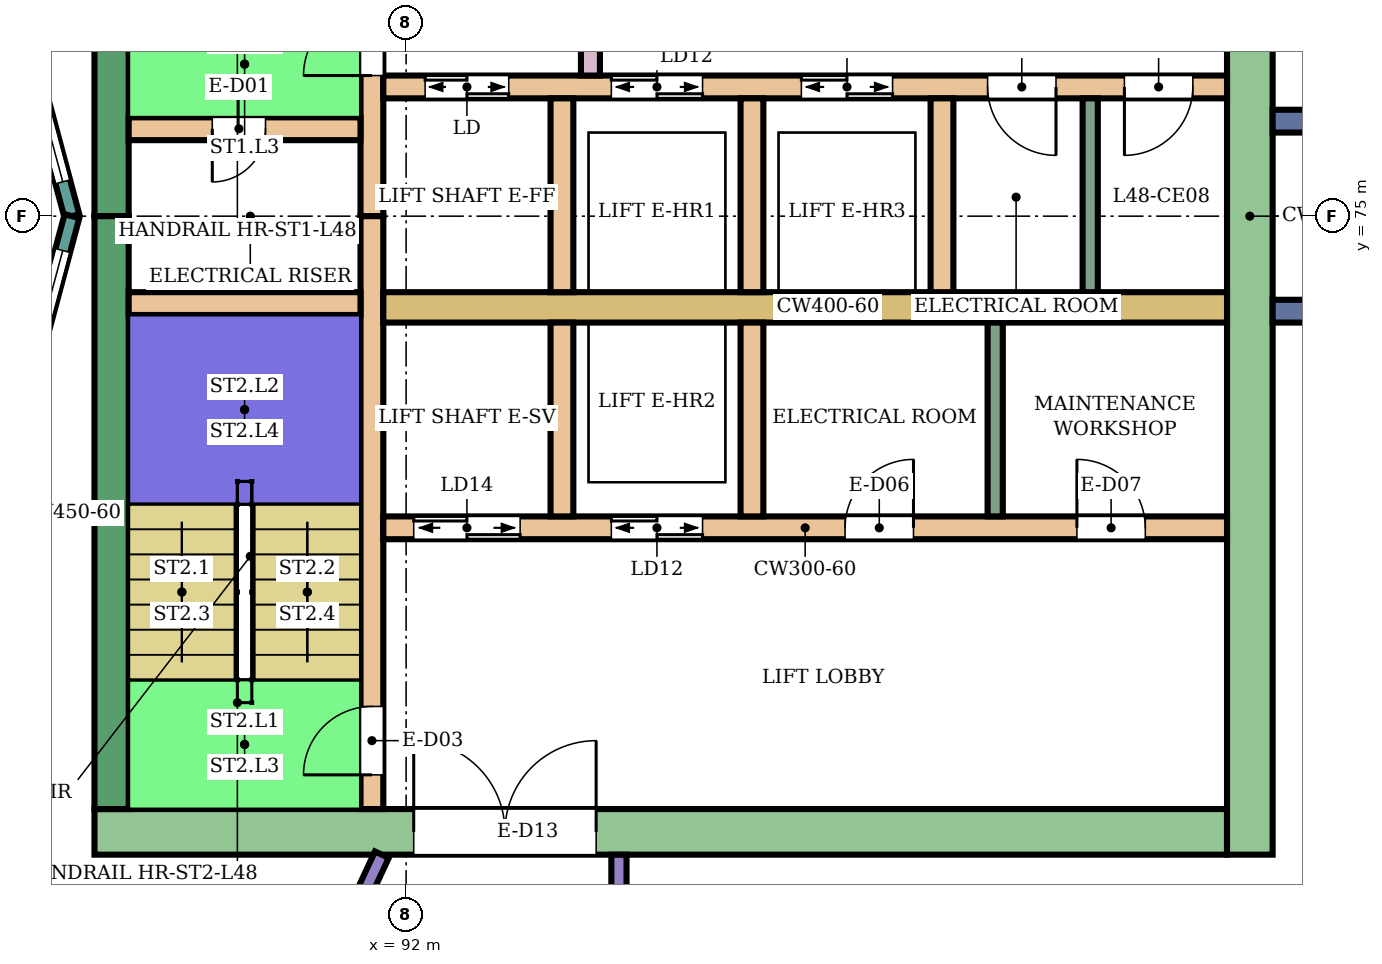
"""IFC4 building model, lengths in metres.
Left out: names, types, materials, properties, quantities, classifications, styles, units other than length and angle.
Written with IfcOpenShell. Run it as: python <this file> out.ifc"""

import sys

from ifc_helpers import new_model, si_unit, direction, frame, frame_2d, origin, place, context, subcontext, project, spatial, rectangle, extrude, element, fill, save


model = new_model("IFC4")
c1 = context("Model", 3, precision=1e-05, world=origin(), true_north=direction((0.0, 1.0)))
c2 = subcontext(c1, "Body", "Model", "MODEL_VIEW")
j1 = project(units=[si_unit("LENGTHUNIT", "METRE"), si_unit("PLANEANGLEUNIT", "RADIAN")], contexts=[c1])
p1 = place(None, origin())
s1 = spatial("IfcSite", under=j1, at=p1, CompositionType="ELEMENT")
p2 = place(p1, origin())
s2 = spatial("IfcBuilding", under=s1, at=p2, CompositionType="ELEMENT")
p3 = place(p2, frame((0.0, 0.0, 206.9)))
s3 = spatial("IfcBuildingStorey", under=s2, at=p3, CompositionType="ELEMENT", Elevation=206.9)
p4 = place(p3, frame((87.9, 66.9, 0.0), z_axis=(0.0, 0.0, 1.0), x_axis=(1.0, 0.0, 0.0)))
e1 = element("IfcWall", 1, at=p4, inside=s3, PredefinedType="SHEAR", context=c2, shape_type="SweptSolid", body=[
    extrude(rectangle(XDim=14.9, YDim=0.6, at=frame_2d((7.45, 0.0))), origin(), (0.0, 0.0, 1.0), 5.28),
])
p5 = place(p4, frame((4.2, 0.0, 0.0)))
e2 = element("IfcOpeningElement", 2, at=p5, cuts=e1, PredefinedType="OPENING", context=c2, shape_type="SweptSolid", body=[
    extrude(rectangle(XDim=2.4, YDim=2.4, at=frame_2d((1.2, 1.2))), frame((0.0, 0.31, 0.0), z_axis=(0.0, -1.0, 0.0), x_axis=(1.0, 0.0, 0.0)), (0.0, 0.0, 1.0), 0.62),
])
for number, where, z_axis, x_axis in (
    (3, (88.125, 75.0, 0.0), (0.0, 0.0, 1.0), (0.0, 1.0, 0.0)),
    (4, (88.125, 67.2, 0.0), (0.0, 0.0, 1.0), (0.0, 1.0, 0.0)),
):
    element("IfcWall", number, at=place(p3, frame(where, z_axis=z_axis, x_axis=x_axis)), inside=s3, PredefinedType="SHEAR", context=c2, shape_type="SweptSolid", body=[
        extrude(rectangle(XDim=7.8, YDim=0.45, at=frame_2d((3.9, 0.0))), origin(), (0.0, 0.0, 1.0), 5.28),
    ])
p6 = place(p3, frame((103.1, 66.6, 0.0), z_axis=(0.0, 0.0, 1.0), x_axis=(0.0, 1.0, 0.0)))
e5 = element("IfcWall", 5, at=p6, inside=s3, PredefinedType="SHEAR", context=c2, shape_type="SweptSolid", body=[
    extrude(rectangle(XDim=16.8, YDim=0.6, at=frame_2d((8.4, 0.0))), origin(), (0.0, 0.0, 1.0), 5.28),
])
p7 = place(p3, frame((91.55, 75.0, 0.0), z_axis=(0.0, 0.0, 1.0), x_axis=(0.0, 1.0, 0.0)))
e6 = element("IfcWall", 6, at=p7, inside=s3, PredefinedType="SHEAR", context=c2, shape_type="SweptSolid", body=[
    extrude(rectangle(XDim=7.8, YDim=0.3, at=frame_2d((3.9, 0.0))), origin(), (0.0, 0.0, 1.0), 5.28),
])
p8 = place(p7, frame((1.85, 0.0, 0.0)))
e7 = element("IfcOpeningElement", 7, at=p8, cuts=e6, PredefinedType="OPENING", context=c2, shape_type="SweptSolid", body=[
    extrude(rectangle(XDim=0.9, YDim=2.1, at=frame_2d((0.45, 1.05))), frame((0.0, 0.16, 0.0), z_axis=(0.0, -1.0, 0.0), x_axis=(1.0, 0.0, 0.0)), (0.0, 0.0, 1.0), 0.32),
])
p9 = place(p3, frame((91.55, 67.2, 0.0), z_axis=(0.0, 0.0, 1.0), x_axis=(0.0, 1.0, 0.0)))
e8 = element("IfcWall", 8, at=p9, inside=s3, PredefinedType="SHEAR", context=c2, shape_type="SweptSolid", body=[
    extrude(rectangle(XDim=7.8, YDim=0.3, at=frame_2d((3.9, 0.0))), origin(), (0.0, 0.0, 1.0), 5.28),
])
p10 = place(p9, frame((0.45, 0.0, 0.0)))
e9 = element("IfcOpeningElement", 9, at=p10, cuts=e8, PredefinedType="OPENING", context=c2, shape_type="SweptSolid", body=[
    extrude(rectangle(XDim=0.9, YDim=2.1, at=frame_2d((0.45, 1.05))), frame((0.0, 0.16, 0.0), z_axis=(0.0, -1.0, 0.0), x_axis=(1.0, 0.0, 0.0)), (0.0, 0.0, 1.0), 0.32),
])
p11 = place(p3, frame((88.35, 76.15, 0.0), z_axis=(0.0, 0.0, 1.0), x_axis=(1.0, 0.0, 0.0)))
e10 = element("IfcWall", 10, at=p11, inside=s3, PredefinedType="SHEAR", context=c2, shape_type="SweptSolid", body=[
    extrude(rectangle(XDim=3.05, YDim=0.3, at=frame_2d((1.525, 0.0))), origin(), (0.0, 0.0, 1.0), 5.28),
])
p12 = place(p11, frame((1.1, 0.0, 0.0)))
e11 = element("IfcOpeningElement", 11, at=p12, cuts=e10, PredefinedType="OPENING", context=c2, shape_type="SweptSolid", body=[
    extrude(rectangle(XDim=0.7, YDim=2.0, at=frame_2d((0.35, 1.0))), frame((0.0, 0.16, 0.0), z_axis=(0.0, -1.0, 0.0), x_axis=(1.0, 0.0, 0.0)), (0.0, 0.0, 1.0), 0.32),
])
p13 = place(p3, frame((88.35, 73.85, 0.0), z_axis=(0.0, 0.0, 1.0), x_axis=(1.0, 0.0, 0.0)))
e12 = element("IfcWall", 12, at=p13, inside=s3, PredefinedType="SHEAR", context=c2, shape_type="SweptSolid", body=[
    extrude(rectangle(XDim=3.05, YDim=0.3, at=frame_2d((1.525, 0.0))), origin(), (0.0, 0.0, 1.0), 5.28),
])
p14 = place(p3, frame((91.7, 76.7, 0.0), z_axis=(0.0, 0.0, 1.0), x_axis=(1.0, 0.0, 0.0)))
e13 = element("IfcWall", 13, at=p14, inside=s3, PredefinedType="SHEAR", context=c2, shape_type="SweptSolid", body=[
    extrude(rectangle(XDim=11.1, YDim=0.3, at=frame_2d((5.55, 0.0))), origin(), (0.0, 0.0, 1.0), 5.28),
])
p15 = place(p14, frame((0.55, 0.0, 0.0)))
e14 = element("IfcOpeningElement", 14, at=p15, cuts=e13, PredefinedType="OPENING", context=c2, shape_type="SweptSolid", body=[
    extrude(rectangle(XDim=1.1, YDim=2.1, at=frame_2d((0.55, 1.05))), frame((0.0, 0.16, 0.0), z_axis=(0.0, -1.0, 0.0), x_axis=(1.0, 0.0, 0.0)), (0.0, 0.0, 1.0), 0.32),
])
p16 = place(p14, frame((3.0, 0.0, 0.0)))
e15 = element("IfcOpeningElement", 15, at=p16, cuts=e13, PredefinedType="OPENING", context=c2, shape_type="SweptSolid", body=[
    extrude(rectangle(XDim=1.2, YDim=2.1, at=frame_2d((0.6, 1.05))), frame((0.0, 0.16, 0.0), z_axis=(0.0, -1.0, 0.0), x_axis=(1.0, 0.0, 0.0)), (0.0, 0.0, 1.0), 0.32),
])
p17 = place(p14, frame((5.5, 0.0, 0.0)))
e16 = element("IfcOpeningElement", 16, at=p17, cuts=e13, PredefinedType="OPENING", context=c2, shape_type="SweptSolid", body=[
    extrude(rectangle(XDim=1.2, YDim=2.1, at=frame_2d((0.6, 1.05))), frame((0.0, 0.16, 0.0), z_axis=(0.0, -1.0, 0.0), x_axis=(1.0, 0.0, 0.0)), (0.0, 0.0, 1.0), 0.32),
])
p18 = place(p14, frame((7.95, 0.0, 0.0)))
e17 = element("IfcOpeningElement", 17, at=p18, cuts=e13, PredefinedType="OPENING", context=c2, shape_type="SweptSolid", body=[
    extrude(rectangle(XDim=0.9, YDim=2.1, at=frame_2d((0.45, 1.05))), frame((0.0, 0.16, 0.0), z_axis=(0.0, -1.0, 0.0), x_axis=(1.0, 0.0, 0.0)), (0.0, 0.0, 1.0), 0.32),
])
p19 = place(p14, frame((9.75, 0.0, 0.0)))
e18 = element("IfcOpeningElement", 18, at=p19, cuts=e13, PredefinedType="OPENING", context=c2, shape_type="SweptSolid", body=[
    extrude(rectangle(XDim=0.9, YDim=2.1, at=frame_2d((0.45, 1.05))), frame((0.0, 0.16, 0.0), z_axis=(0.0, -1.0, 0.0), x_axis=(1.0, 0.0, 0.0)), (0.0, 0.0, 1.0), 0.32),
])
p20 = place(p3, frame((91.7, 73.8, 0.0), z_axis=(0.0, 0.0, 1.0), x_axis=(1.0, 0.0, 0.0)))
e19 = element("IfcWall", 19, at=p20, inside=s3, PredefinedType="SHEAR", context=c2, shape_type="SweptSolid", body=[
    extrude(rectangle(XDim=11.1, YDim=0.4, at=frame_2d((5.55, 0.0))), origin(), (0.0, 0.0, 1.0), 5.28),
])
p21 = place(p3, frame((91.7, 70.9, 0.0), z_axis=(0.0, 0.0, 1.0), x_axis=(1.0, 0.0, 0.0)))
e20 = element("IfcWall", 20, at=p21, inside=s3, PredefinedType="SHEAR", context=c2, shape_type="SweptSolid", body=[
    extrude(rectangle(XDim=11.1, YDim=0.3, at=frame_2d((5.55, 0.0))), origin(), (0.0, 0.0, 1.0), 5.28),
])
p22 = place(p21, frame((0.4, 0.0, 0.0)))
e21 = element("IfcOpeningElement", 21, at=p22, cuts=e20, PredefinedType="OPENING", context=c2, shape_type="SweptSolid", body=[
    extrude(rectangle(XDim=1.4, YDim=2.1, at=frame_2d((0.7, 1.05))), frame((0.0, 0.16, 0.0), z_axis=(0.0, -1.0, 0.0), x_axis=(1.0, 0.0, 0.0)), (0.0, 0.0, 1.0), 0.32),
])
p23 = place(p21, frame((3.0, 0.0, 0.0)))
e22 = element("IfcOpeningElement", 22, at=p23, cuts=e20, PredefinedType="OPENING", context=c2, shape_type="SweptSolid", body=[
    extrude(rectangle(XDim=1.2, YDim=2.1, at=frame_2d((0.6, 1.05))), frame((0.0, 0.16, 0.0), z_axis=(0.0, -1.0, 0.0), x_axis=(1.0, 0.0, 0.0)), (0.0, 0.0, 1.0), 0.32),
])
p24 = place(p21, frame((6.075, 0.0, 0.0)))
e23 = element("IfcOpeningElement", 23, at=p24, cuts=e20, PredefinedType="OPENING", context=c2, shape_type="SweptSolid", body=[
    extrude(rectangle(XDim=0.9, YDim=2.1, at=frame_2d((0.45, 1.05))), frame((0.0, 0.16, 0.0), z_axis=(0.0, -1.0, 0.0), x_axis=(1.0, 0.0, 0.0)), (0.0, 0.0, 1.0), 0.32),
])
p25 = place(p21, frame((9.125, 0.0, 0.0)))
e24 = element("IfcOpeningElement", 24, at=p25, cuts=e20, PredefinedType="OPENING", context=c2, shape_type="SweptSolid", body=[
    extrude(rectangle(XDim=0.9, YDim=2.1, at=frame_2d((0.45, 1.05))), frame((0.0, 0.16, 0.0), z_axis=(0.0, -1.0, 0.0), x_axis=(1.0, 0.0, 0.0)), (0.0, 0.0, 1.0), 0.32),
])
for number, where, z_axis, x_axis in (
    (25, (94.05, 74.0, 0.0), (0.0, 0.0, 1.0), (0.0, 1.0, 0.0)),
    (26, (96.55, 74.0, 0.0), (0.0, 0.0, 1.0), (0.0, 1.0, 0.0)),
    (27, (99.05, 74.0, 0.0), (0.0, 0.0, 1.0), (0.0, 1.0, 0.0)),
    (28, (94.05, 71.05, 0.0), (0.0, 0.0, 1.0), (0.0, 1.0, 0.0)),
    (29, (96.55, 71.05, 0.0), (0.0, 0.0, 1.0), (0.0, 1.0, 0.0)),
):
    element("IfcWall", number, at=place(p3, frame(where, z_axis=z_axis, x_axis=x_axis)), inside=s3, PredefinedType="SHEAR", context=c2, shape_type="SweptSolid", body=[
        extrude(rectangle(XDim=2.55, YDim=0.3, at=frame_2d((1.275, 0.0))), origin(), (0.0, 0.0, 1.0), 5.28),
    ])
p26 = place(p3, frame((94.425, 76.85, 0.0), z_axis=(0.0, 0.0, 1.0), x_axis=(0.0, 1.0, 0.0)))
e30 = element("IfcWall", 30, at=p26, inside=s3, PredefinedType="SHEAR", context=c2, shape_type="SweptSolid", body=[
    extrude(rectangle(XDim=1.5, YDim=0.25, at=frame_2d((0.75, 0.0))), origin(), (0.0, 0.0, 1.0), 5.28),
])
for number, where, z_axis, x_axis in (
    (31, (103.4, 73.75, 0.0), (0.0, 0.0, 1.0), (1.0, 0.0, 0.0)),
    (32, (103.4, 76.25, 0.0), (0.0, 0.0, 1.0), (1.0, 0.0, 0.0)),
):
    element("IfcWall", number, at=place(p3, frame(where, z_axis=z_axis, x_axis=x_axis)), inside=s3, PredefinedType="NOTDEFINED", context=c2, shape_type="SweptSolid", body=[
        extrude(rectangle(XDim=2.416, YDim=0.3, at=frame_2d((1.208, 0.0))), origin(), (0.0, 0.0, 1.0), 5.6),
    ])
p27 = place(p3, frame((87.604, 75.0, 0.0), z_axis=(0.0, 0.0, 1.0), x_axis=(-0.258789828301, 0.965933654434, 0.0)))
e33 = element("IfcWall", 33, at=p27, inside=s3, PredefinedType="NOTDEFINED", context=c2, shape_type="SweptSolid", body=[
    extrude(rectangle(XDim=3.936, YDim=0.2, at=frame_2d((1.968, 0.0))), origin(), (0.0, 0.0, 1.0), 5.6),
])
p28 = place(p27, frame((0.468, 0.0, 0.9)))
e34 = element("IfcOpeningElement", 34, at=p28, cuts=e33, PredefinedType="OPENING", context=c2, shape_type="SweptSolid", body=[
    extrude(rectangle(XDim=3.0, YDim=2.3, at=frame_2d((1.5, 1.15))), frame((0.0, 0.11, 0.0), z_axis=(0.0, -1.0, 0.0), x_axis=(1.0, 0.0, 0.0)), (0.0, 0.0, 1.0), 0.22),
])
p29 = place(p3, frame((86.585, 71.198, 0.0), z_axis=(0.0, 0.0, 1.0), x_axis=(0.258789828301, 0.965933654434, 0.0)))
e35 = element("IfcWall", 35, at=p29, inside=s3, PredefinedType="NOTDEFINED", context=c2, shape_type="SweptSolid", body=[
    extrude(rectangle(XDim=3.936, YDim=0.2, at=frame_2d((1.968, 0.0))), origin(), (0.0, 0.0, 1.0), 5.6),
])
p30 = place(p29, frame((0.468, 0.0, 0.9)))
e36 = element("IfcOpeningElement", 36, at=p30, cuts=e35, PredefinedType="OPENING", context=c2, shape_type="SweptSolid", body=[
    extrude(rectangle(XDim=3.0, YDim=2.3, at=frame_2d((1.5, 1.15))), frame((0.0, 0.11, 0.0), z_axis=(0.0, -1.0, 0.0), x_axis=(1.0, 0.0, 0.0)), (0.0, 0.0, 1.0), 0.22),
])
p31 = place(p3, frame((83.848, 68.333, 0.0), z_axis=(0.0, 0.0, 1.0), x_axis=(0.499897383715, -0.866084641219, 0.0)))
e37 = element("IfcWall", 37, at=p31, inside=s3, PredefinedType="PARTITIONING", context=c2, shape_type="SweptSolid", body=[
    extrude(rectangle(XDim=9.383, YDim=0.2, at=frame_2d((4.692, 0.0))), origin(), (0.0, 0.0, 1.0), 5.15),
])
p32 = place(p3, frame((88.502, 59.774, 0.0), z_axis=(0.0, 0.0, 1.0), x_axis=(0.422164659646, 0.906519167004, 0.0)))
e38 = element("IfcWall", 38, at=p32, inside=s3, PredefinedType="PARTITIONING", context=c2, shape_type="SweptSolid", body=[
    extrude(rectangle(XDim=7.53, YDim=0.2, at=frame_2d((3.765, 0.0))), origin(), (0.0, 0.0, 1.0), 5.15),
])
p33 = place(p32, frame((3.308, 0.0, 0.0)))
e39 = element("IfcOpeningElement", 39, at=p33, cuts=e38, PredefinedType="OPENING", context=c2, shape_type="SweptSolid", body=[
    extrude(rectangle(XDim=1.2, YDim=2.4, at=frame_2d((0.6, 1.2))), frame((0.0, 0.11, 0.0), z_axis=(0.0, -1.0, 0.0), x_axis=(1.0, 0.0, 0.0)), (0.0, 0.0, 1.0), 0.22),
])
p34 = place(p3, frame((94.8, 65.1, 0.0), z_axis=(0.0, 0.0, 1.0), x_axis=(0.0, 1.0, 0.0)))
e40 = element("IfcWall", 40, at=p34, inside=s3, PredefinedType="PARTITIONING", context=c2, shape_type="SweptSolid", body=[
    extrude(rectangle(XDim=1.499, YDim=0.2, at=frame_2d((0.75, 0.0))), origin(), (0.0, 0.0, 1.0), 5.15),
])
for number, where, z_axis, x_axis in (
    (41, (101.0, 74.0, 0.0), (0.0, 0.0, 1.0), (0.0, 1.0, 0.0)),
    (42, (99.75, 71.05, 0.0), (0.0, 0.0, 1.0), (0.0, 1.0, 0.0)),
):
    element("IfcWall", number, at=place(p3, frame(where, z_axis=z_axis, x_axis=x_axis)), inside=s3, PredefinedType="PARTITIONING", context=c2, shape_type="SweptSolid", body=[
        extrude(rectangle(XDim=2.55, YDim=0.2, at=frame_2d((1.275, 0.0))), origin(), (0.0, 0.0, 1.0), 5.28),
    ])
p35 = place(p28, origin())
e43 = element("IfcWindow", 43, at=p35, inside=s3, PartitioningType="SINGLE_PANEL", PredefinedType="WINDOW", context=c2, shape_type="SweptSolid", body=[
    extrude(rectangle(XDim=3.0, YDim=2.3, at=frame_2d((1.5, 1.15))), frame((0.0, 0.03, 0.0), z_axis=(0.0, -1.0, 0.0), x_axis=(1.0, 0.0, 0.0)), (0.0, 0.0, 1.0), 0.06),
])
fill(e34, e43)
p36 = place(p30, origin())
e44 = element("IfcWindow", 44, at=p36, inside=s3, PartitioningType="SINGLE_PANEL", PredefinedType="WINDOW", context=c2, shape_type="SweptSolid", body=[
    extrude(rectangle(XDim=3.0, YDim=2.3, at=frame_2d((1.5, 1.15))), frame((0.0, 0.03, 0.0), z_axis=(0.0, -1.0, 0.0), x_axis=(1.0, 0.0, 0.0)), (0.0, 0.0, 1.0), 0.06),
])
fill(e36, e44)
p37 = place(p12, frame((0.7, 0.0, 0.0), z_axis=(0.0, 0.0, 1.0), x_axis=(-1.0, 0.0, 0.0)))
e45 = element("IfcDoor", 45, at=p37, inside=s3, OperationType="SINGLE_SWING_RIGHT", PredefinedType="DOOR", context=c2, shape_type="SweptSolid", body=[
    extrude(rectangle(XDim=0.7, YDim=2.0, at=frame_2d((0.35, 1.0))), frame((0.0, 0.025, 0.0), z_axis=(0.0, -1.0, 0.0), x_axis=(1.0, 0.0, 0.0)), (0.0, 0.0, 1.0), 0.05),
])
fill(e11, e45)
p38 = place(p8, origin())
e46 = element("IfcDoor", 46, at=p38, inside=s3, OperationType="SINGLE_SWING_LEFT", PredefinedType="DOOR", context=c2, shape_type="SweptSolid", body=[
    extrude(rectangle(XDim=0.9, YDim=2.1, at=frame_2d((0.45, 1.05))), frame((0.0, 0.025, 0.0), z_axis=(0.0, -1.0, 0.0), x_axis=(1.0, 0.0, 0.0)), (0.0, 0.0, 1.0), 0.05),
])
fill(e7, e46)
p39 = place(p10, origin())
e47 = element("IfcDoor", 47, at=p39, inside=s3, OperationType="SINGLE_SWING_LEFT", PredefinedType="DOOR", context=c2, shape_type="SweptSolid", body=[
    extrude(rectangle(XDim=0.9, YDim=2.1, at=frame_2d((0.45, 1.05))), frame((0.0, 0.025, 0.0), z_axis=(0.0, -1.0, 0.0), x_axis=(1.0, 0.0, 0.0)), (0.0, 0.0, 1.0), 0.05),
])
fill(e9, e47)
p40 = place(p15, origin())
e48 = element("IfcDoor", 48, at=p40, inside=s3, OperationType="DOUBLE_DOOR_SLIDING", PredefinedType="DOOR", context=c2, shape_type="SweptSolid", body=[
    extrude(rectangle(XDim=1.1, YDim=2.1, at=frame_2d((0.55, 1.05))), frame((0.0, 0.025, 0.0), z_axis=(0.0, -1.0, 0.0), x_axis=(1.0, 0.0, 0.0)), (0.0, 0.0, 1.0), 0.05),
])
fill(e14, e48)
p41 = place(p16, origin())
e49 = element("IfcDoor", 49, at=p41, inside=s3, OperationType="DOUBLE_DOOR_SLIDING", PredefinedType="DOOR", context=c2, shape_type="SweptSolid", body=[
    extrude(rectangle(XDim=1.2, YDim=2.1, at=frame_2d((0.6, 1.05))), frame((0.0, 0.025, 0.0), z_axis=(0.0, -1.0, 0.0), x_axis=(1.0, 0.0, 0.0)), (0.0, 0.0, 1.0), 0.05),
])
fill(e15, e49)
p42 = place(p17, origin())
e50 = element("IfcDoor", 50, at=p42, inside=s3, OperationType="DOUBLE_DOOR_SLIDING", PredefinedType="DOOR", context=c2, shape_type="SweptSolid", body=[
    extrude(rectangle(XDim=1.2, YDim=2.1, at=frame_2d((0.6, 1.05))), frame((0.0, 0.025, 0.0), z_axis=(0.0, -1.0, 0.0), x_axis=(1.0, 0.0, 0.0)), (0.0, 0.0, 1.0), 0.05),
])
fill(e16, e50)
p43 = place(p18, frame((0.9, 0.0, 0.0), z_axis=(0.0, 0.0, 1.0), x_axis=(-1.0, 0.0, 0.0)))
e51 = element("IfcDoor", 51, at=p43, inside=s3, OperationType="SINGLE_SWING_LEFT", PredefinedType="DOOR", context=c2, shape_type="SweptSolid", body=[
    extrude(rectangle(XDim=0.9, YDim=2.1, at=frame_2d((0.45, 1.05))), frame((0.0, 0.025, 0.0), z_axis=(0.0, -1.0, 0.0), x_axis=(1.0, 0.0, 0.0)), (0.0, 0.0, 1.0), 0.05),
])
fill(e17, e51)
p44 = place(p19, frame((0.9, 0.0, 0.0), z_axis=(0.0, 0.0, 1.0), x_axis=(-1.0, 0.0, 0.0)))
e52 = element("IfcDoor", 52, at=p44, inside=s3, OperationType="SINGLE_SWING_RIGHT", PredefinedType="DOOR", context=c2, shape_type="SweptSolid", body=[
    extrude(rectangle(XDim=0.9, YDim=2.1, at=frame_2d((0.45, 1.05))), frame((0.0, 0.025, 0.0), z_axis=(0.0, -1.0, 0.0), x_axis=(1.0, 0.0, 0.0)), (0.0, 0.0, 1.0), 0.05),
])
fill(e18, e52)
p45 = place(p22, origin())
e53 = element("IfcDoor", 53, at=p45, inside=s3, OperationType="DOUBLE_DOOR_SLIDING", PredefinedType="DOOR", context=c2, shape_type="SweptSolid", body=[
    extrude(rectangle(XDim=1.4, YDim=2.1, at=frame_2d((0.7, 1.05))), frame((0.0, 0.025, 0.0), z_axis=(0.0, -1.0, 0.0), x_axis=(1.0, 0.0, 0.0)), (0.0, 0.0, 1.0), 0.05),
])
fill(e21, e53)
p46 = place(p23, origin())
e54 = element("IfcDoor", 54, at=p46, inside=s3, OperationType="DOUBLE_DOOR_SLIDING", PredefinedType="DOOR", context=c2, shape_type="SweptSolid", body=[
    extrude(rectangle(XDim=1.2, YDim=2.1, at=frame_2d((0.6, 1.05))), frame((0.0, 0.025, 0.0), z_axis=(0.0, -1.0, 0.0), x_axis=(1.0, 0.0, 0.0)), (0.0, 0.0, 1.0), 0.05),
])
fill(e22, e54)
p47 = place(p24, origin())
e55 = element("IfcDoor", 55, at=p47, inside=s3, OperationType="SINGLE_SWING_RIGHT", PredefinedType="DOOR", context=c2, shape_type="SweptSolid", body=[
    extrude(rectangle(XDim=0.9, YDim=2.1, at=frame_2d((0.45, 1.05))), frame((0.0, 0.025, 0.0), z_axis=(0.0, -1.0, 0.0), x_axis=(1.0, 0.0, 0.0)), (0.0, 0.0, 1.0), 0.05),
])
fill(e23, e55)
p48 = place(p25, origin())
e56 = element("IfcDoor", 56, at=p48, inside=s3, OperationType="SINGLE_SWING_LEFT", PredefinedType="DOOR", context=c2, shape_type="SweptSolid", body=[
    extrude(rectangle(XDim=0.9, YDim=2.1, at=frame_2d((0.45, 1.05))), frame((0.0, 0.025, 0.0), z_axis=(0.0, -1.0, 0.0), x_axis=(1.0, 0.0, 0.0)), (0.0, 0.0, 1.0), 0.05),
])
fill(e24, e56)
p49 = place(p5, origin())
e57 = element("IfcDoor", 57, at=p49, inside=s3, OperationType="DOUBLE_DOOR_SINGLE_SWING", PredefinedType="DOOR", context=c2, shape_type="SweptSolid", body=[
    extrude(rectangle(XDim=2.4, YDim=2.4, at=frame_2d((1.2, 1.2))), frame((0.0, 0.025, 0.0), z_axis=(0.0, -1.0, 0.0), x_axis=(1.0, 0.0, 0.0)), (0.0, 0.0, 1.0), 0.05),
])
fill(e2, e57)
save(model, sys.argv[1])
